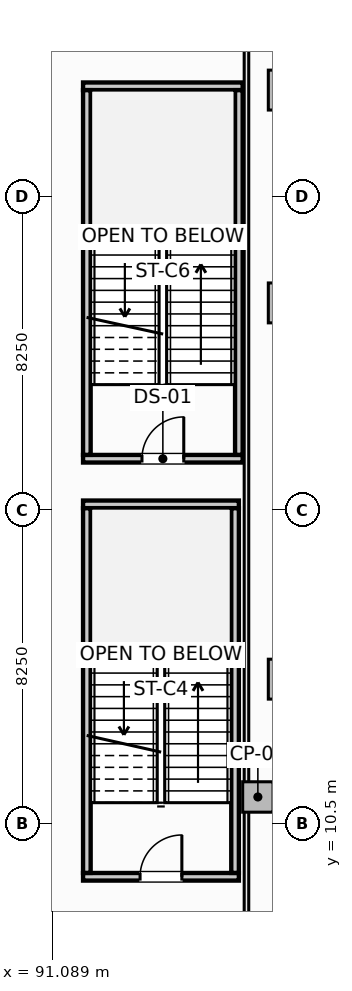
"""IFC4 building model, lengths in metres.
Left out: names, types, materials, properties, quantities, classifications, styles, units other than length and angle.
Written with IfcOpenShell. Run it as: python <this file> out.ifc"""

import sys

from ifc_helpers import new_model, si_unit, direction, frame, frame_2d, origin, origin_2d, place, context, subcontext, project, spatial, rectangle, extrude, element, fill, save


model = new_model("IFC4")
c1 = context("Model", 3, precision=1e-05, world=origin(), true_north=direction((0.0, 1.0)))
c2 = subcontext(c1, "Body", "Model", "MODEL_VIEW")
j1 = project(units=[si_unit("LENGTHUNIT", "METRE"), si_unit("PLANEANGLEUNIT", "RADIAN")], contexts=[c1])
p1 = place(None, origin())
s1 = spatial("IfcSite", under=j1, at=p1, CompositionType="ELEMENT")
p2 = place(p1, origin())
s2 = spatial("IfcBuilding", under=s1, at=p2, CompositionType="ELEMENT")
p3 = place(p2, frame((0.0, 0.0, -9.0)))
s3 = spatial("IfcBuildingStorey", under=s2, at=p3, CompositionType="ELEMENT", Elevation=-9.0)
for number, where, z_axis, x_axis in (
    (1, (97.3, 14.3, -0.32), (0.0, 0.0, 1.0), (1.0, 0.0, 0.0)),
    (2, (97.3, 24.2, -0.32), (0.0, 0.0, 1.0), (1.0, 0.0, 0.0)),
    (3, (97.3, 29.8, -0.32), (0.0, 0.0, 1.0), (1.0, 0.0, 0.0)),
):
    element("IfcColumn", number, at=place(p3, frame(where, z_axis=z_axis, x_axis=x_axis)), inside=s3, PredefinedType="COLUMN", context=c2, shape_type="SweptSolid", body=[
        extrude(rectangle(XDim=1.05, YDim=1.05, at=origin_2d()), origin(), (0.0, 0.0, 1.0), 4.5),
    ])
p4 = place(p3, frame((96.5, 11.2, -0.32), z_axis=(0.0, 0.0, 1.0), x_axis=(1.0, 0.0, 0.0)))
e4 = element("IfcColumn", 4, at=p4, inside=s3, PredefinedType="PILASTER", context=c2, shape_type="SweptSolid", body=[
    extrude(rectangle(XDim=0.8, YDim=0.8, at=origin_2d()), origin(), (0.0, 0.0, 1.0), 4.5),
])
p5 = place(p3, frame((91.9, 9.1, -0.32), z_axis=(0.0, 0.0, 1.0), x_axis=(1.0, 0.0, 0.0)))
e5 = element("IfcWall", 5, at=p5, inside=s3, PredefinedType="SHEAR", context=c2, shape_type="SweptSolid", body=[
    extrude(rectangle(XDim=4.1, YDim=0.2, at=frame_2d((2.05, 0.0))), origin(), (0.0, 0.0, 1.0), 4.5),
])
p6 = place(p5, frame((1.5, 0.0, 0.32)))
e6 = element("IfcOpeningElement", 6, at=p6, cuts=e5, PredefinedType="OPENING", context=c2, shape_type="SweptSolid", body=[
    extrude(rectangle(XDim=1.1, YDim=2.15, at=frame_2d((0.55, 1.075))), frame((0.0, 0.11, 0.0), z_axis=(0.0, -1.0, 0.0), x_axis=(1.0, 0.0, 0.0)), (0.0, 0.0, 1.0), 0.22),
])
p7 = place(p3, frame((91.9, 18.9, -0.32), z_axis=(0.0, 0.0, 1.0), x_axis=(1.0, 0.0, 0.0)))
e7 = element("IfcWall", 7, at=p7, inside=s3, PredefinedType="SHEAR", context=c2, shape_type="SweptSolid", body=[
    extrude(rectangle(XDim=4.1, YDim=0.2, at=frame_2d((2.05, 0.0))), origin(), (0.0, 0.0, 1.0), 4.5),
])
for number, where, z_axis, x_axis in (
    (8, (92.0, 9.202, -0.32), (0.0, 0.0, 1.0), (0.0, 1.0, 0.0)),
    (9, (95.9, 9.202, -0.32), (0.0, 0.0, 1.0), (0.0, 1.0, 0.0)),
):
    element("IfcWall", number, at=place(p3, frame(where, z_axis=z_axis, x_axis=x_axis)), inside=s3, PredefinedType="SHEAR", context=c2, shape_type="SweptSolid", body=[
        extrude(rectangle(XDim=9.596, YDim=0.2, at=frame_2d((4.798, 0.0))), origin(), (0.0, 0.0, 1.0), 4.5),
    ])
p8 = place(p3, frame((91.9, 20.1, -0.32), z_axis=(0.0, 0.0, 1.0), x_axis=(1.0, 0.0, 0.0)))
e10 = element("IfcWall", 10, at=p8, inside=s3, PredefinedType="SHEAR", context=c2, shape_type="SweptSolid", body=[
    extrude(rectangle(XDim=4.2, YDim=0.2, at=frame_2d((2.1, 0.0))), origin(), (0.0, 0.0, 1.0), 4.5),
])
p9 = place(p8, frame((1.55, 0.0, 0.32)))
e11 = element("IfcOpeningElement", 11, at=p9, cuts=e10, PredefinedType="OPENING", context=c2, shape_type="SweptSolid", body=[
    extrude(rectangle(XDim=1.1, YDim=2.15, at=frame_2d((0.55, 1.075))), frame((0.0, 0.11, 0.0), z_axis=(0.0, -1.0, 0.0), x_axis=(1.0, 0.0, 0.0)), (0.0, 0.0, 1.0), 0.22),
])
p10 = place(p3, frame((91.9, 29.9, -0.32), z_axis=(0.0, 0.0, 1.0), x_axis=(1.0, 0.0, 0.0)))
e12 = element("IfcWall", 12, at=p10, inside=s3, PredefinedType="SHEAR", context=c2, shape_type="SweptSolid", body=[
    extrude(rectangle(XDim=4.2, YDim=0.2, at=frame_2d((2.1, 0.0))), origin(), (0.0, 0.0, 1.0), 4.5),
])
for number, where, z_axis, x_axis in (
    (13, (92.0, 20.202, -0.32), (0.0, 0.0, 1.0), (0.0, 1.0, 0.0)),
    (14, (96.0, 20.202, -0.32), (0.0, 0.0, 1.0), (0.0, 1.0, 0.0)),
):
    element("IfcWall", number, at=place(p3, frame(where, z_axis=z_axis, x_axis=x_axis)), inside=s3, PredefinedType="SHEAR", context=c2, shape_type="SweptSolid", body=[
        extrude(rectangle(XDim=9.596, YDim=0.2, at=frame_2d((4.798, 0.0))), origin(), (0.0, 0.0, 1.0), 4.5),
    ])
p11 = place(p3, frame((96.2, 6.612, 0.0), z_axis=(0.0, 0.0, 1.0), x_axis=(0.0, 1.0, 0.0)))
e15 = element("IfcWall", 15, at=p11, inside=s3, PredefinedType="PARTITIONING", context=c2, shape_type="SweptSolid", body=[
    extrude(rectangle(XDim=39.976, YDim=0.12, at=frame_2d((19.988, 0.0))), origin(), (0.0, 0.0, 1.0), 4.18),
])
p12 = place(p6, origin())
e16 = element("IfcDoor", 16, at=p12, inside=s3, OperationType="SINGLE_SWING_RIGHT", PredefinedType="DOOR", context=c2, shape_type="SweptSolid", body=[
    extrude(rectangle(XDim=1.1, YDim=2.15, at=frame_2d((0.55, 1.075))), frame((0.0, 0.025, 0.0), z_axis=(0.0, -1.0, 0.0), x_axis=(1.0, 0.0, 0.0)), (0.0, 0.0, 1.0), 0.05),
])
fill(e6, e16)
p13 = place(p9, origin())
e17 = element("IfcDoor", 17, at=p13, inside=s3, OperationType="SINGLE_SWING_RIGHT", PredefinedType="DOOR", context=c2, shape_type="SweptSolid", body=[
    extrude(rectangle(XDim=1.1, YDim=2.15, at=frame_2d((0.55, 1.075))), frame((0.0, 0.025, 0.0), z_axis=(0.0, -1.0, 0.0), x_axis=(1.0, 0.0, 0.0)), (0.0, 0.0, 1.0), 0.05),
])
fill(e11, e17)
save(model, sys.argv[1])
